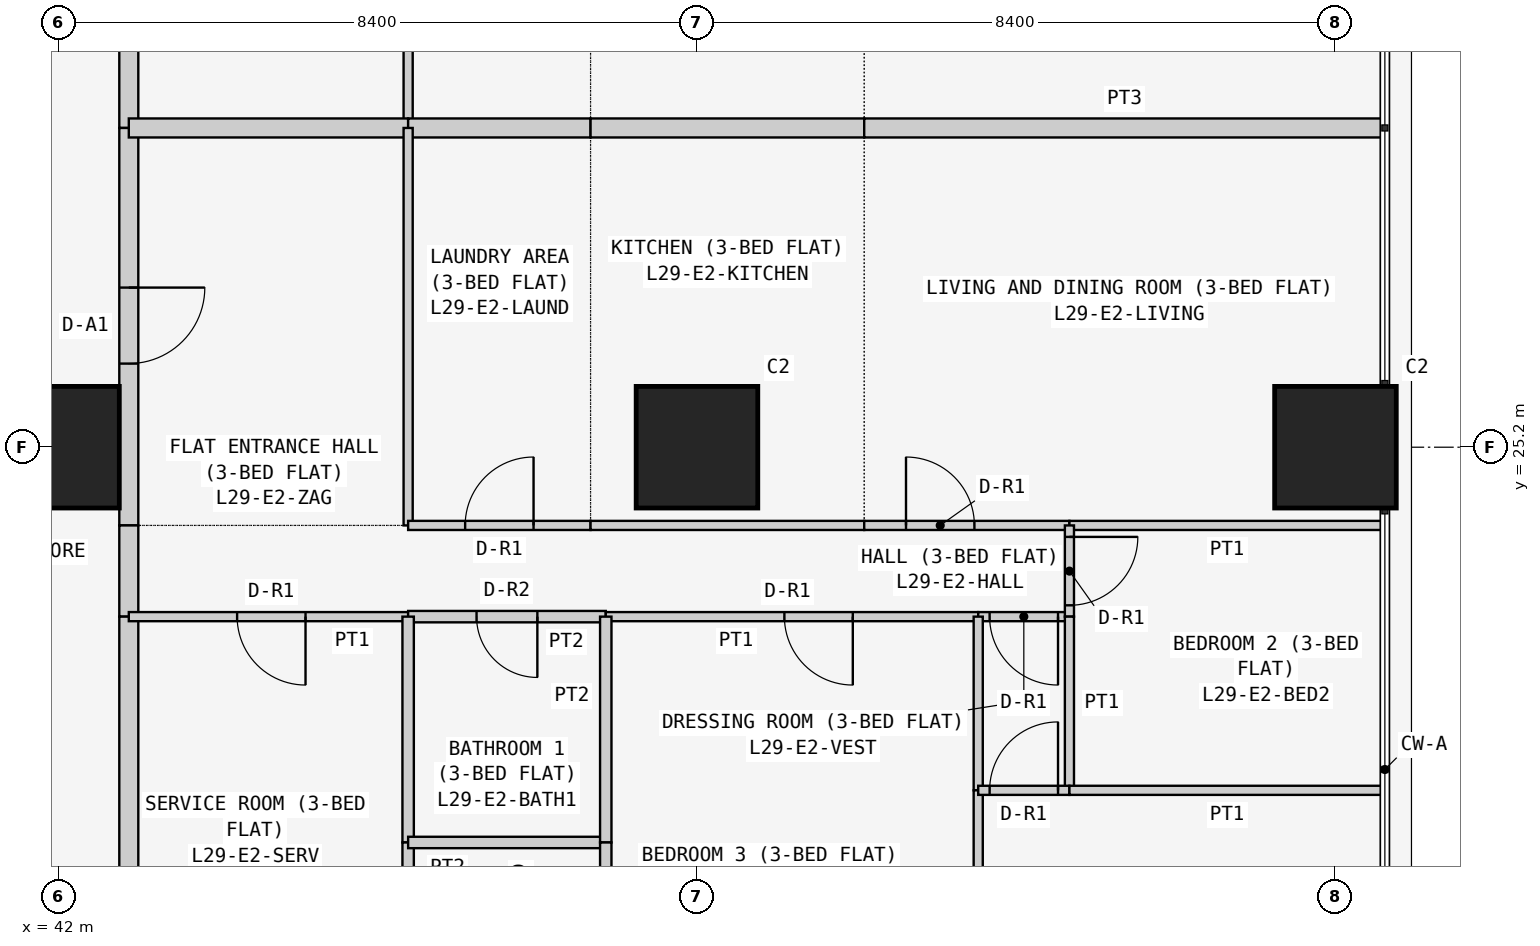
"""IFC4 building model, lengths in metres.
Left out: names, types, materials, properties, quantities, classifications, styles, units other than length and angle.
Written with IfcOpenShell. Run it as: python <this file> out.ifc"""

import sys

from ifc_helpers import new_model, si_unit, direction, frame, frame_2d, origin, origin_2d, place, context, subcontext, project, spatial, rectangle, extrude, element, fill, save


model = new_model("IFC4")
c1 = context("Model", 3, precision=1e-05, world=origin(), true_north=direction((0.0, 1.0)))
c2 = subcontext(c1, "Body", "Model", "MODEL_VIEW")
j1 = project(units=[si_unit("LENGTHUNIT", "METRE"), si_unit("PLANEANGLEUNIT", "RADIAN")], contexts=[c1])
p1 = place(None, origin())
s1 = spatial("IfcSite", under=j1, at=p1, CompositionType="ELEMENT")
p2 = place(p1, origin())
s2 = spatial("IfcBuilding", under=s1, at=p2, CompositionType="ELEMENT")
p3 = place(p2, frame((0.0, 0.0, 116.1)))
s3 = spatial("IfcBuildingStorey", under=s2, at=p3, CompositionType="ELEMENT", Elevation=116.1)
for number, where, z_axis, x_axis in (
    (1, (42.0, 25.2, 0.0), (0.0, 0.0, 1.0), (1.0, 0.0, 0.0)),
    (2, (50.4, 25.2, 0.0), (0.0, 0.0, 1.0), (1.0, 0.0, 0.0)),
    (3, (58.8, 25.2, 0.0), (0.0, 0.0, 1.0), (1.0, 0.0, 0.0)),
):
    element("IfcColumn", number, at=place(p3, frame(where, z_axis=z_axis, x_axis=x_axis)), inside=s3, PredefinedType="COLUMN", context=c2, shape_type="SweptSolid", body=[
        extrude(rectangle(XDim=1.6, YDim=1.6, at=origin_2d()), origin(), (0.0, 0.0, 1.0), 3.6),
    ])
p4 = place(p3, frame((42.925, 34.629, 0.0), z_axis=(0.0, 0.0, 1.0), x_axis=(0.0, -1.0, 0.0)))
e4 = element("IfcWall", 4, at=p4, inside=s3, PredefinedType="PARTITIONING", context=c2, shape_type="SweptSolid", body=[
    extrude(rectangle(XDim=5.229, YDim=0.25, at=frame_2d((2.615, 0.0))), origin(), (0.0, 0.0, 1.0), 3.45),
])
p5 = place(p4, frame((2.129, 0.0, 0.0)))
e5 = element("IfcOpeningElement", 5, at=p5, cuts=e4, PredefinedType="OPENING", context=c2, shape_type="SweptSolid", body=[
    extrude(rectangle(XDim=1.0, YDim=2.1, at=frame_2d((0.5, 1.05))), frame((0.0, 0.135, 0.0), z_axis=(0.0, -1.0, 0.0), x_axis=(1.0, 0.0, 0.0)), (0.0, 0.0, 1.0), 0.27),
])
p6 = place(p3, frame((42.925, 29.4, 0.0), z_axis=(0.0, 0.0, 1.0), x_axis=(0.0, -1.0, 0.0)))
e6 = element("IfcWall", 6, at=p6, inside=s3, PredefinedType="PARTITIONING", context=c2, shape_type="SweptSolid", body=[
    extrude(rectangle(XDim=5.229, YDim=0.25, at=frame_2d((2.615, 0.0))), origin(), (0.0, 0.0, 1.0), 3.45),
])
p7 = place(p6, frame((2.1, 0.0, 0.0)))
e7 = element("IfcOpeningElement", 7, at=p7, cuts=e6, PredefinedType="OPENING", context=c2, shape_type="SweptSolid", body=[
    extrude(rectangle(XDim=1.0, YDim=2.1, at=frame_2d((0.5, 1.05))), frame((0.0, 0.135, 0.0), z_axis=(0.0, -1.0, 0.0), x_axis=(1.0, 0.0, 0.0)), (0.0, 0.0, 1.0), 0.27),
])
p8 = place(p3, frame((42.925, 24.171, 0.0), z_axis=(0.0, 0.0, 1.0), x_axis=(0.0, -1.0, 0.0)))
e8 = element("IfcWall", 8, at=p8, inside=s3, PredefinedType="PARTITIONING", context=c2, shape_type="SweptSolid", body=[
    extrude(rectangle(XDim=1.2, YDim=0.25, at=frame_2d((0.6, 0.0))), origin(), (0.0, 0.0, 1.0), 3.45),
])
p9 = place(p3, frame((42.925, 22.971, 0.0), z_axis=(0.0, 0.0, 1.0), x_axis=(0.0, -1.0, 0.0)))
e9 = element("IfcWall", 9, at=p9, inside=s3, PredefinedType="PARTITIONING", context=c2, shape_type="SweptSolid", body=[
    extrude(rectangle(XDim=6.871, YDim=0.25, at=frame_2d((3.436, 0.0))), origin(), (0.0, 0.0, 1.0), 3.45),
])
p10 = place(p3, frame((46.6, 29.4, 0.0), z_axis=(0.0, 0.0, 1.0), x_axis=(0.0, 1.0, 0.0)))
e10 = element("IfcWall", 10, at=p10, inside=s3, PredefinedType="PARTITIONING", context=c2, shape_type="SweptSolid", body=[
    extrude(rectangle(XDim=5.229, YDim=0.12, at=frame_2d((2.615, 0.0))), origin(), (0.0, 0.0, 1.0), 3.45),
])
p11 = place(p3, frame((42.925, 29.4, 0.0), z_axis=(0.0, 0.0, 1.0), x_axis=(1.0, 0.0, 0.0)))
e11 = element("IfcWall", 11, at=p11, inside=s3, PredefinedType="PARTITIONING", context=c2, shape_type="SweptSolid", body=[
    extrude(rectangle(XDim=3.675, YDim=0.25, at=frame_2d((1.837, 0.0))), origin(), (0.0, 0.0, 1.0), 3.45),
])
p12 = place(p3, frame((46.6, 29.4, 0.0), z_axis=(0.0, 0.0, 1.0), x_axis=(1.0, 0.0, 0.0)))
e12 = element("IfcWall", 12, at=p12, inside=s3, PredefinedType="PARTITIONING", context=c2, shape_type="SweptSolid", body=[
    extrude(rectangle(XDim=2.4, YDim=0.25, at=frame_2d((1.2, 0.0))), origin(), (0.0, 0.0, 1.0), 3.45),
])
p13 = place(p3, frame((49.0, 29.4, 0.0), z_axis=(0.0, 0.0, 1.0), x_axis=(1.0, 0.0, 0.0)))
e13 = element("IfcWall", 13, at=p13, inside=s3, PredefinedType="PARTITIONING", context=c2, shape_type="SweptSolid", body=[
    extrude(rectangle(XDim=3.6, YDim=0.25, at=frame_2d((1.8, 0.0))), origin(), (0.0, 0.0, 1.0), 3.45),
])
p14 = place(p3, frame((52.6, 29.4, 0.0), z_axis=(0.0, 0.0, 1.0), x_axis=(1.0, 0.0, 0.0)))
e14 = element("IfcWall", 14, at=p14, inside=s3, PredefinedType="PARTITIONING", context=c2, shape_type="SweptSolid", body=[
    extrude(rectangle(XDim=6.85, YDim=0.25, at=frame_2d((3.425, 0.0))), origin(), (0.0, 0.0, 1.0), 3.45),
])
p15 = place(p3, frame((46.6, 29.4, 0.0), z_axis=(0.0, 0.0, 1.0), x_axis=(0.0, -1.0, 0.0)))
e15 = element("IfcWall", 15, at=p15, inside=s3, PredefinedType="PARTITIONING", context=c2, shape_type="SweptSolid", body=[
    extrude(rectangle(XDim=5.229, YDim=0.12, at=frame_2d((2.615, 0.0))), origin(), (0.0, 0.0, 1.0), 3.45),
])
p16 = place(p3, frame((49.0, 24.171, 0.0), z_axis=(0.0, 0.0, 1.0), x_axis=(-1.0, 0.0, 0.0)))
e16 = element("IfcWall", 16, at=p16, inside=s3, PredefinedType="PARTITIONING", context=c2, shape_type="SweptSolid", body=[
    extrude(rectangle(XDim=2.4, YDim=0.12, at=frame_2d((1.2, 0.0))), origin(), (0.0, 0.0, 1.0), 3.45),
])
p17 = place(p16, frame((0.75, 0.0, 0.0)))
e17 = element("IfcOpeningElement", 17, at=p17, cuts=e16, PredefinedType="OPENING", context=c2, shape_type="SweptSolid", body=[
    extrude(rectangle(XDim=0.9, YDim=2.1, at=frame_2d((0.45, 1.05))), frame((0.0, 0.07, 0.0), z_axis=(0.0, -1.0, 0.0), x_axis=(1.0, 0.0, 0.0)), (0.0, 0.0, 1.0), 0.14),
])
p18 = place(p3, frame((52.6, 24.171, 0.0), z_axis=(0.0, 0.0, 1.0), x_axis=(-1.0, 0.0, 0.0)))
e18 = element("IfcWall", 18, at=p18, inside=s3, PredefinedType="PARTITIONING", context=c2, shape_type="SweptSolid", body=[
    extrude(rectangle(XDim=3.6, YDim=0.12, at=frame_2d((1.8, 0.0))), origin(), (0.0, 0.0, 1.0), 3.45),
])
p19 = place(p3, frame((55.3, 24.171, 0.0), z_axis=(0.0, 0.0, 1.0), x_axis=(-1.0, 0.0, 0.0)))
e19 = element("IfcWall", 19, at=p19, inside=s3, PredefinedType="PARTITIONING", context=c2, shape_type="SweptSolid", body=[
    extrude(rectangle(XDim=2.7, YDim=0.12, at=frame_2d((1.35, 0.0))), origin(), (0.0, 0.0, 1.0), 3.45),
])
p20 = place(p19, frame((1.25, 0.0, 0.0)))
e20 = element("IfcOpeningElement", 20, at=p20, cuts=e19, PredefinedType="OPENING", context=c2, shape_type="SweptSolid", body=[
    extrude(rectangle(XDim=0.9, YDim=2.1, at=frame_2d((0.45, 1.05))), frame((0.0, 0.07, 0.0), z_axis=(0.0, -1.0, 0.0), x_axis=(1.0, 0.0, 0.0)), (0.0, 0.0, 1.0), 0.14),
])
p21 = place(p3, frame((59.45, 24.171, 0.0), z_axis=(0.0, 0.0, 1.0), x_axis=(-1.0, 0.0, 0.0)))
e21 = element("IfcWall", 21, at=p21, inside=s3, PredefinedType="PARTITIONING", context=c2, shape_type="SweptSolid", body=[
    extrude(rectangle(XDim=4.15, YDim=0.12, at=frame_2d((2.075, 0.0))), origin(), (0.0, 0.0, 1.0), 3.45),
])
p22 = place(p3, frame((46.6, 22.971, 0.0), z_axis=(0.0, 0.0, 1.0), x_axis=(-1.0, 0.0, 0.0)))
e22 = element("IfcWall", 22, at=p22, inside=s3, PredefinedType="PARTITIONING", context=c2, shape_type="SweptSolid", body=[
    extrude(rectangle(XDim=3.675, YDim=0.12, at=frame_2d((1.837, 0.0))), origin(), (0.0, 0.0, 1.0), 3.45),
])
p23 = place(p22, frame((1.35, 0.0, 0.0)))
e23 = element("IfcOpeningElement", 23, at=p23, cuts=e22, PredefinedType="OPENING", context=c2, shape_type="SweptSolid", body=[
    extrude(rectangle(XDim=0.9, YDim=2.1, at=frame_2d((0.45, 1.05))), frame((0.0, 0.07, 0.0), z_axis=(0.0, -1.0, 0.0), x_axis=(1.0, 0.0, 0.0)), (0.0, 0.0, 1.0), 0.14),
])
p24 = place(p3, frame((49.2, 22.971, 0.0), z_axis=(0.0, 0.0, 1.0), x_axis=(-1.0, 0.0, 0.0)))
e24 = element("IfcWall", 24, at=p24, inside=s3, PredefinedType="PARTITIONING", context=c2, shape_type="SweptSolid", body=[
    extrude(rectangle(XDim=2.6, YDim=0.15, at=frame_2d((1.3, 0.0))), origin(), (0.0, 0.0, 1.0), 3.45),
])
p25 = place(p24, frame((0.9, 0.0, 0.0)))
e25 = element("IfcOpeningElement", 25, at=p25, cuts=e24, PredefinedType="OPENING", context=c2, shape_type="SweptSolid", body=[
    extrude(rectangle(XDim=0.8, YDim=2.1, at=frame_2d((0.4, 1.05))), frame((0.0, 0.085, 0.0), z_axis=(0.0, -1.0, 0.0), x_axis=(1.0, 0.0, 0.0)), (0.0, 0.0, 1.0), 0.17),
])
p26 = place(p3, frame((54.1, 22.971, 0.0), z_axis=(0.0, 0.0, 1.0), x_axis=(-1.0, 0.0, 0.0)))
e26 = element("IfcWall", 26, at=p26, inside=s3, PredefinedType="PARTITIONING", context=c2, shape_type="SweptSolid", body=[
    extrude(rectangle(XDim=4.9, YDim=0.12, at=frame_2d((2.45, 0.0))), origin(), (0.0, 0.0, 1.0), 3.45),
])
p27 = place(p26, frame((1.65, 0.0, 0.0)))
e27 = element("IfcOpeningElement", 27, at=p27, cuts=e26, PredefinedType="OPENING", context=c2, shape_type="SweptSolid", body=[
    extrude(rectangle(XDim=0.9, YDim=2.1, at=frame_2d((0.45, 1.05))), frame((0.0, 0.07, 0.0), z_axis=(0.0, -1.0, 0.0), x_axis=(1.0, 0.0, 0.0)), (0.0, 0.0, 1.0), 0.14),
])
p28 = place(p3, frame((55.3, 22.971, 0.0), z_axis=(0.0, 0.0, 1.0), x_axis=(-1.0, 0.0, 0.0)))
e28 = element("IfcWall", 28, at=p28, inside=s3, PredefinedType="PARTITIONING", context=c2, shape_type="SweptSolid", body=[
    extrude(rectangle(XDim=1.2, YDim=0.12, at=frame_2d((0.6, 0.0))), origin(), (0.0, 0.0, 1.0), 3.45),
])
p29 = place(p28, frame((0.15, 0.0, 0.0)))
e29 = element("IfcOpeningElement", 29, at=p29, cuts=e28, PredefinedType="OPENING", context=c2, shape_type="SweptSolid", body=[
    extrude(rectangle(XDim=0.9, YDim=2.1, at=frame_2d((0.45, 1.05))), frame((0.0, 0.07, 0.0), z_axis=(0.0, -1.0, 0.0), x_axis=(1.0, 0.0, 0.0)), (0.0, 0.0, 1.0), 0.14),
])
p30 = place(p3, frame((55.3, 24.171, 0.0), z_axis=(0.0, 0.0, 1.0), x_axis=(0.0, -1.0, 0.0)))
e30 = element("IfcWall", 30, at=p30, inside=s3, PredefinedType="PARTITIONING", context=c2, shape_type="SweptSolid", body=[
    extrude(rectangle(XDim=1.2, YDim=0.12, at=frame_2d((0.6, 0.0))), origin(), (0.0, 0.0, 1.0), 3.45),
])
p31 = place(p30, frame((0.151, 0.0, 0.0)))
e31 = element("IfcOpeningElement", 31, at=p31, cuts=e30, PredefinedType="OPENING", context=c2, shape_type="SweptSolid", body=[
    extrude(rectangle(XDim=0.9, YDim=2.1, at=frame_2d((0.45, 1.05))), frame((0.0, 0.07, 0.0), z_axis=(0.0, -1.0, 0.0), x_axis=(1.0, 0.0, 0.0)), (0.0, 0.0, 1.0), 0.14),
])
p32 = place(p3, frame((46.6, 22.971, 0.0), z_axis=(0.0, 0.0, 1.0), x_axis=(0.0, -1.0, 0.0)))
e32 = element("IfcWall", 32, at=p32, inside=s3, PredefinedType="PARTITIONING", context=c2, shape_type="SweptSolid", body=[
    extrude(rectangle(XDim=2.971, YDim=0.15, at=frame_2d((1.485, 0.0))), origin(), (0.0, 0.0, 1.0), 3.45),
])
p33 = place(p3, frame((46.6, 20.0, 0.0), z_axis=(0.0, 0.0, 1.0), x_axis=(0.0, -1.0, 0.0)))
e33 = element("IfcWall", 33, at=p33, inside=s3, PredefinedType="PARTITIONING", context=c2, shape_type="SweptSolid", body=[
    extrude(rectangle(XDim=3.9, YDim=0.15, at=frame_2d((1.95, 0.0))), origin(), (0.0, 0.0, 1.0), 3.45),
])
p34 = place(p33, frame((1.45, 0.0, 0.0)))
e34 = element("IfcOpeningElement", 34, at=p34, cuts=e33, PredefinedType="OPENING", context=c2, shape_type="SweptSolid", body=[
    extrude(rectangle(XDim=0.8, YDim=2.1, at=frame_2d((0.4, 1.05))), frame((0.0, 0.085, 0.0), z_axis=(0.0, -1.0, 0.0), x_axis=(1.0, 0.0, 0.0)), (0.0, 0.0, 1.0), 0.17),
])
p35 = place(p3, frame((49.2, 20.0, 0.0), z_axis=(0.0, 0.0, 1.0), x_axis=(-1.0, 0.0, 0.0)))
e35 = element("IfcWall", 35, at=p35, inside=s3, PredefinedType="PARTITIONING", context=c2, shape_type="SweptSolid", body=[
    extrude(rectangle(XDim=2.6, YDim=0.15, at=frame_2d((1.3, 0.0))), origin(), (0.0, 0.0, 1.0), 3.45),
])
p36 = place(p3, frame((49.2, 22.971, 0.0), z_axis=(0.0, 0.0, 1.0), x_axis=(0.0, -1.0, 0.0)))
e36 = element("IfcWall", 36, at=p36, inside=s3, PredefinedType="PARTITIONING", context=c2, shape_type="SweptSolid", body=[
    extrude(rectangle(XDim=2.971, YDim=0.15, at=frame_2d((1.485, 0.0))), origin(), (0.0, 0.0, 1.0), 3.45),
])
p37 = place(p3, frame((49.2, 20.0, 0.0), z_axis=(0.0, 0.0, 1.0), x_axis=(0.0, -1.0, 0.0)))
e37 = element("IfcWall", 37, at=p37, inside=s3, PredefinedType="PARTITIONING", context=c2, shape_type="SweptSolid", body=[
    extrude(rectangle(XDim=3.9, YDim=0.15, at=frame_2d((1.95, 0.0))), origin(), (0.0, 0.0, 1.0), 3.45),
])
p38 = place(p3, frame((54.1, 22.971, 0.0), z_axis=(0.0, 0.0, 1.0), x_axis=(0.0, -1.0, 0.0)))
e38 = element("IfcWall", 38, at=p38, inside=s3, PredefinedType="PARTITIONING", context=c2, shape_type="SweptSolid", body=[
    extrude(rectangle(XDim=2.285, YDim=0.12, at=frame_2d((1.143, 0.0))), origin(), (0.0, 0.0, 1.0), 3.45),
])
p39 = place(p3, frame((54.1, 20.686, 0.0), z_axis=(0.0, 0.0, 1.0), x_axis=(0.0, -1.0, 0.0)))
e39 = element("IfcWall", 39, at=p39, inside=s3, PredefinedType="PARTITIONING", context=c2, shape_type="SweptSolid", body=[
    extrude(rectangle(XDim=4.586, YDim=0.12, at=frame_2d((2.293, 0.0))), origin(), (0.0, 0.0, 1.0), 3.45),
])
p40 = place(p3, frame((55.3, 22.971, 0.0), z_axis=(0.0, 0.0, 1.0), x_axis=(0.0, -1.0, 0.0)))
e40 = element("IfcWall", 40, at=p40, inside=s3, PredefinedType="PARTITIONING", context=c2, shape_type="SweptSolid", body=[
    extrude(rectangle(XDim=2.285, YDim=0.12, at=frame_2d((1.143, 0.0))), origin(), (0.0, 0.0, 1.0), 3.45),
])
p41 = place(p3, frame((55.3, 20.686, 0.0), z_axis=(0.0, 0.0, 1.0), x_axis=(-1.0, 0.0, 0.0)))
e41 = element("IfcWall", 41, at=p41, inside=s3, PredefinedType="PARTITIONING", context=c2, shape_type="SweptSolid", body=[
    extrude(rectangle(XDim=1.2, YDim=0.12, at=frame_2d((0.6, 0.0))), origin(), (0.0, 0.0, 1.0), 3.45),
])
p42 = place(p41, frame((0.15, 0.0, 0.0)))
e42 = element("IfcOpeningElement", 42, at=p42, cuts=e41, PredefinedType="OPENING", context=c2, shape_type="SweptSolid", body=[
    extrude(rectangle(XDim=0.9, YDim=2.1, at=frame_2d((0.45, 1.05))), frame((0.0, 0.07, 0.0), z_axis=(0.0, -1.0, 0.0), x_axis=(1.0, 0.0, 0.0)), (0.0, 0.0, 1.0), 0.14),
])
p43 = place(p3, frame((59.45, 20.686, 0.0), z_axis=(0.0, 0.0, 1.0), x_axis=(-1.0, 0.0, 0.0)))
e43 = element("IfcWall", 43, at=p43, inside=s3, PredefinedType="PARTITIONING", context=c2, shape_type="SweptSolid", body=[
    extrude(rectangle(XDim=4.15, YDim=0.12, at=frame_2d((2.075, 0.0))), origin(), (0.0, 0.0, 1.0), 3.45),
])
p44 = place(p7, origin())
e44 = element("IfcDoor", 44, at=p44, inside=s3, OperationType="SINGLE_SWING_LEFT", PredefinedType="DOOR", context=c2, shape_type="SweptSolid", body=[
    extrude(rectangle(XDim=1.0, YDim=2.1, at=frame_2d((0.5, 1.05))), frame((0.0, 0.025, 0.0), z_axis=(0.0, -1.0, 0.0), x_axis=(1.0, 0.0, 0.0)), (0.0, 0.0, 1.0), 0.05),
])
fill(e7, e44)
p45 = place(p17, frame((0.9, 0.0, 0.0), z_axis=(0.0, 0.0, 1.0), x_axis=(-1.0, 0.0, 0.0)))
e45 = element("IfcDoor", 45, at=p45, inside=s3, OperationType="SINGLE_SWING_RIGHT", PredefinedType="DOOR", context=c2, shape_type="SweptSolid", body=[
    extrude(rectangle(XDim=0.9, YDim=2.1, at=frame_2d((0.45, 1.05))), frame((0.0, 0.025, 0.0), z_axis=(0.0, -1.0, 0.0), x_axis=(1.0, 0.0, 0.0)), (0.0, 0.0, 1.0), 0.05),
])
fill(e17, e45)
p46 = place(p20, frame((0.9, 0.0, 0.0), z_axis=(0.0, 0.0, 1.0), x_axis=(-1.0, 0.0, 0.0)))
e46 = element("IfcDoor", 46, at=p46, inside=s3, OperationType="SINGLE_SWING_LEFT", PredefinedType="DOOR", context=c2, shape_type="SweptSolid", body=[
    extrude(rectangle(XDim=0.9, YDim=2.1, at=frame_2d((0.45, 1.05))), frame((0.0, 0.025, 0.0), z_axis=(0.0, -1.0, 0.0), x_axis=(1.0, 0.0, 0.0)), (0.0, 0.0, 1.0), 0.05),
])
fill(e20, e46)
p47 = place(p23, origin())
e47 = element("IfcDoor", 47, at=p47, inside=s3, OperationType="SINGLE_SWING_LEFT", PredefinedType="DOOR", context=c2, shape_type="SweptSolid", body=[
    extrude(rectangle(XDim=0.9, YDim=2.1, at=frame_2d((0.45, 1.05))), frame((0.0, 0.025, 0.0), z_axis=(0.0, -1.0, 0.0), x_axis=(1.0, 0.0, 0.0)), (0.0, 0.0, 1.0), 0.05),
])
fill(e23, e47)
p48 = place(p25, origin())
e48 = element("IfcDoor", 48, at=p48, inside=s3, OperationType="SINGLE_SWING_LEFT", PredefinedType="DOOR", context=c2, shape_type="SweptSolid", body=[
    extrude(rectangle(XDim=0.8, YDim=2.1, at=frame_2d((0.4, 1.05))), frame((0.0, 0.025, 0.0), z_axis=(0.0, -1.0, 0.0), x_axis=(1.0, 0.0, 0.0)), (0.0, 0.0, 1.0), 0.05),
])
fill(e25, e48)
p49 = place(p27, origin())
e49 = element("IfcDoor", 49, at=p49, inside=s3, OperationType="SINGLE_SWING_LEFT", PredefinedType="DOOR", context=c2, shape_type="SweptSolid", body=[
    extrude(rectangle(XDim=0.9, YDim=2.1, at=frame_2d((0.45, 1.05))), frame((0.0, 0.025, 0.0), z_axis=(0.0, -1.0, 0.0), x_axis=(1.0, 0.0, 0.0)), (0.0, 0.0, 1.0), 0.05),
])
fill(e27, e49)
p50 = place(p29, origin())
e50 = element("IfcDoor", 50, at=p50, inside=s3, OperationType="SINGLE_SWING_LEFT", PredefinedType="DOOR", context=c2, shape_type="SweptSolid", body=[
    extrude(rectangle(XDim=0.9, YDim=2.1, at=frame_2d((0.45, 1.05))), frame((0.0, 0.025, 0.0), z_axis=(0.0, -1.0, 0.0), x_axis=(1.0, 0.0, 0.0)), (0.0, 0.0, 1.0), 0.05),
])
fill(e29, e50)
p51 = place(p42, frame((0.9, 0.0, 0.0), z_axis=(0.0, 0.0, 1.0), x_axis=(-1.0, 0.0, 0.0)))
e51 = element("IfcDoor", 51, at=p51, inside=s3, OperationType="SINGLE_SWING_RIGHT", PredefinedType="DOOR", context=c2, shape_type="SweptSolid", body=[
    extrude(rectangle(XDim=0.9, YDim=2.1, at=frame_2d((0.45, 1.05))), frame((0.0, 0.025, 0.0), z_axis=(0.0, -1.0, 0.0), x_axis=(1.0, 0.0, 0.0)), (0.0, 0.0, 1.0), 0.05),
])
fill(e42, e51)
p52 = place(p31, origin())
e52 = element("IfcDoor", 52, at=p52, inside=s3, OperationType="SINGLE_SWING_LEFT", PredefinedType="DOOR", context=c2, shape_type="SweptSolid", body=[
    extrude(rectangle(XDim=0.9, YDim=2.1, at=frame_2d((0.45, 1.05))), frame((0.0, 0.025, 0.0), z_axis=(0.0, -1.0, 0.0), x_axis=(1.0, 0.0, 0.0)), (0.0, 0.0, 1.0), 0.05),
])
fill(e31, e52)
save(model, sys.argv[1])
